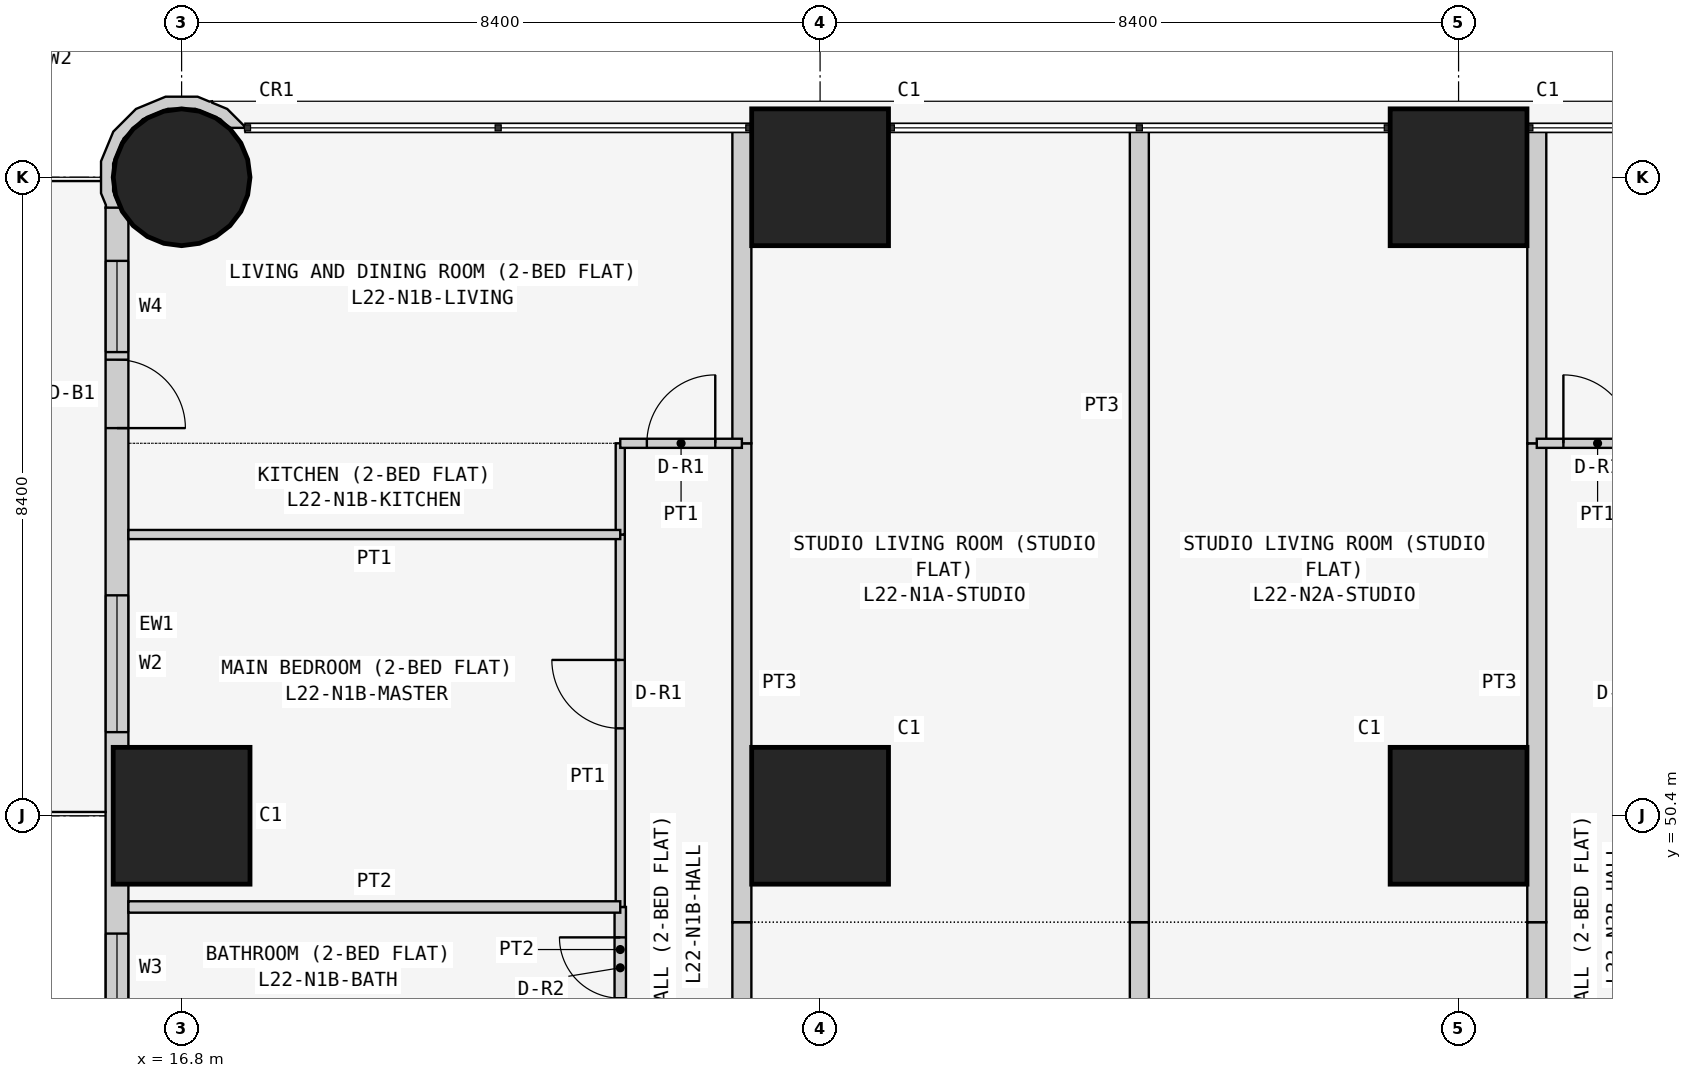
"""IFC4 building model, lengths in metres.
Left out: names, types, materials, properties, quantities, classifications, styles, units other than length and angle.
Written with IfcOpenShell. Run it as: python <this file> out.ifc"""

import sys

from ifc_helpers import new_model, si_unit, direction, frame, frame_2d, origin, origin_2d, place, context, subcontext, project, spatial, polyline, rectangle, circle, outline, extrude, element, fill, save


model = new_model("IFC4")
c1 = context("Model", 3, precision=1e-05, world=origin(), true_north=direction((0.0, 1.0)))
c2 = subcontext(c1, "Body", "Model", "MODEL_VIEW")
j1 = project(units=[si_unit("LENGTHUNIT", "METRE"), si_unit("PLANEANGLEUNIT", "RADIAN")], contexts=[c1])
p1 = place(None, origin())
s1 = spatial("IfcSite", under=j1, at=p1, CompositionType="ELEMENT")
p2 = place(p1, origin())
s2 = spatial("IfcBuilding", under=s1, at=p2, CompositionType="ELEMENT")
p3 = place(p2, frame((0.0, 0.0, 88.5)))
s3 = spatial("IfcBuildingStorey", under=s2, at=p3, CompositionType="ELEMENT", Elevation=88.5)
p4 = place(p3, frame((16.8, 50.4, 0.0), z_axis=(0.0, 0.0, 1.0), x_axis=(1.0, 0.0, 0.0)))
e1 = element("IfcColumn", 1, at=p4, inside=s3, PredefinedType="COLUMN", context=c2, shape_type="SweptSolid", body=[
    extrude(rectangle(XDim=1.8, YDim=1.8, at=origin_2d()), origin(), (0.0, 0.0, 1.0), 3.6),
])
p5 = place(p3, frame((16.8, 58.8, 0.0), z_axis=(0.0, 0.0, 1.0), x_axis=(1.0, 0.0, 0.0)))
e2 = element("IfcColumn", 2, at=p5, inside=s3, PredefinedType="COLUMN", context=c2, shape_type="SweptSolid", body=[
    extrude(circle(Radius=0.9, at=origin_2d()), origin(), (0.0, 0.0, 1.0), 3.6),
])
for number, where, z_axis, x_axis in (
    (3, (25.2, 50.4, 0.0), (0.0, 0.0, 1.0), (1.0, 0.0, 0.0)),
    (4, (25.2, 58.8, 0.0), (0.0, 0.0, 1.0), (1.0, 0.0, 0.0)),
    (5, (33.6, 50.4, 0.0), (0.0, 0.0, 1.0), (1.0, 0.0, 0.0)),
    (6, (33.6, 58.8, 0.0), (0.0, 0.0, 1.0), (1.0, 0.0, 0.0)),
):
    element("IfcColumn", number, at=place(p3, frame(where, z_axis=z_axis, x_axis=x_axis)), inside=s3, PredefinedType="COLUMN", context=c2, shape_type="SweptSolid", body=[
        extrude(rectangle(XDim=1.8, YDim=1.8, at=origin_2d()), origin(), (0.0, 0.0, 1.0), 3.6),
    ])
p6 = place(p3, frame((15.95, 58.4, 0.0), z_axis=(0.0, 0.0, 1.0), x_axis=(0.0, -1.0, 0.0)))
e7 = element("IfcWall", 7, at=p6, inside=s3, PredefinedType="SOLIDWALL", context=c2, shape_type="SweptSolid", body=[
    extrude(rectangle(XDim=15.7, YDim=0.3, at=frame_2d((7.85, 0.0))), origin(), (0.0, 0.0, 1.0), 3.45),
])
p7 = place(p6, frame((12.4, 0.0, 0.9)))
e8 = element("IfcOpeningElement", 8, at=p7, cuts=e7, PredefinedType="OPENING", context=c2, shape_type="SweptSolid", body=[
    extrude(rectangle(XDim=1.8, YDim=1.5, at=frame_2d((0.9, 0.75))), frame((0.0, 0.16, 0.0), z_axis=(0.0, -1.0, 0.0), x_axis=(1.0, 0.0, 0.0)), (0.0, 0.0, 1.0), 0.32),
])
p8 = place(p6, frame((9.55, 0.0, 1.5)))
e9 = element("IfcOpeningElement", 9, at=p8, cuts=e7, PredefinedType="OPENING", context=c2, shape_type="SweptSolid", body=[
    extrude(rectangle(XDim=0.9, YDim=0.7, at=frame_2d((0.45, 0.35))), frame((0.0, 0.16, 0.0), z_axis=(0.0, -1.0, 0.0), x_axis=(1.0, 0.0, 0.0)), (0.0, 0.0, 1.0), 0.32),
])
p9 = place(p6, frame((5.1, 0.0, 0.9)))
e10 = element("IfcOpeningElement", 10, at=p9, cuts=e7, PredefinedType="OPENING", context=c2, shape_type="SweptSolid", body=[
    extrude(rectangle(XDim=1.8, YDim=1.5, at=frame_2d((0.9, 0.75))), frame((0.0, 0.16, 0.0), z_axis=(0.0, -1.0, 0.0), x_axis=(1.0, 0.0, 0.0)), (0.0, 0.0, 1.0), 0.32),
])
p10 = place(p6, frame((2.0, 0.0, 0.0)))
e11 = element("IfcOpeningElement", 11, at=p10, cuts=e7, PredefinedType="OPENING", context=c2, shape_type="SweptSolid", body=[
    extrude(rectangle(XDim=0.9, YDim=2.4, at=frame_2d((0.45, 1.2))), frame((0.0, 0.16, 0.0), z_axis=(0.0, -1.0, 0.0), x_axis=(1.0, 0.0, 0.0)), (0.0, 0.0, 1.0), 0.32),
])
p11 = place(p6, frame((0.7, 0.0, 0.9)))
e12 = element("IfcOpeningElement", 12, at=p11, cuts=e7, PredefinedType="OPENING", context=c2, shape_type="SweptSolid", body=[
    extrude(rectangle(XDim=1.2, YDim=1.5, at=frame_2d((0.6, 0.75))), frame((0.0, 0.16, 0.0), z_axis=(0.0, -1.0, 0.0), x_axis=(1.0, 0.0, 0.0)), (0.0, 0.0, 1.0), 0.32),
])
p12 = place(p3, frame((17.567, 59.411, 0.0), z_axis=(0.0, 0.0, 1.0), x_axis=(-0.377204953059, 0.926129809145, 0.0)))
e13 = element("IfcWall", 13, at=p12, inside=s3, PredefinedType="SOLIDWALL", context=c2, shape_type="SweptSolid", body=[
    extrude(outline(polyline([(-0.27, 2.017), (-0.37, 1.841), (-0.102, 1.842), (0.23, 1.707), (0.484, 1.455), (0.624, 1.125), (0.626, 0.766), (0.491, 0.434), (0.239, 0.18), (0.09, 0.117), (0.011, -0.078), (0.024, -0.083), (0.329, 0.045), (0.48, 0.198), (0.499, 0.193), (0.508, 0.225), (0.626, 0.345), (0.785, 0.736), (0.782, 1.157), (0.619, 1.546), (0.319, 1.842), (-0.072, 2.002), (-0.24, 2.0), (-0.27, 2.017)])), origin(), (0.0, 0.0, 1.0), 3.45),
])
p13 = place(p3, frame((24.171, 49.0, 0.0), z_axis=(0.0, 0.0, 1.0), x_axis=(0.0, -1.0, 0.0)))
e14 = element("IfcWall", 14, at=p13, inside=s3, PredefinedType="PARTITIONING", context=c2, shape_type="SweptSolid", body=[
    extrude(rectangle(XDim=3.6, YDim=0.25, at=frame_2d((1.8, 0.0))), origin(), (0.0, 0.0, 1.0), 3.45),
])
p14 = place(p3, frame((29.4, 45.4, 0.0), z_axis=(0.0, 0.0, 1.0), x_axis=(0.0, 1.0, 0.0)))
e15 = element("IfcWall", 15, at=p14, inside=s3, PredefinedType="PARTITIONING", context=c2, shape_type="SweptSolid", body=[
    extrude(rectangle(XDim=3.6, YDim=0.25, at=frame_2d((1.8, 0.0))), origin(), (0.0, 0.0, 1.0), 2.848),
])
p15 = place(p3, frame((24.171, 55.3, 0.0), z_axis=(0.0, 0.0, 1.0), x_axis=(0.0, -1.0, 0.0)))
e16 = element("IfcWall", 16, at=p15, inside=s3, PredefinedType="PARTITIONING", context=c2, shape_type="SweptSolid", body=[
    extrude(rectangle(XDim=6.3, YDim=0.25, at=frame_2d((3.15, 0.0))), origin(), (0.0, 0.0, 1.0), 3.45),
])
p16 = place(p3, frame((24.171, 59.45, 0.0), z_axis=(0.0, 0.0, 1.0), x_axis=(0.0, -1.0, 0.0)))
e17 = element("IfcWall", 17, at=p16, inside=s3, PredefinedType="PARTITIONING", context=c2, shape_type="SweptSolid", body=[
    extrude(rectangle(XDim=4.15, YDim=0.25, at=frame_2d((2.075, 0.0))), origin(), (0.0, 0.0, 1.0), 3.45),
])
p17 = place(p3, frame((29.4, 49.0, 0.0), z_axis=(0.0, 0.0, 1.0), x_axis=(0.0, 1.0, 0.0)))
e18 = element("IfcWall", 18, at=p17, inside=s3, PredefinedType="PARTITIONING", context=c2, shape_type="SweptSolid", body=[
    extrude(rectangle(XDim=10.45, YDim=0.25, at=frame_2d((5.225, 0.0))), origin(), (0.0, 0.0, 1.0), 2.848),
])
p18 = place(p3, frame((22.571, 49.2, 0.0), z_axis=(0.0, 0.0, 1.0), x_axis=(0.0, -1.0, 0.0)))
e19 = element("IfcWall", 19, at=p18, inside=s3, PredefinedType="PARTITIONING", context=c2, shape_type="SweptSolid", body=[
    extrude(rectangle(XDim=1.6, YDim=0.15, at=frame_2d((0.8, 0.0))), origin(), (0.0, 0.0, 1.0), 3.45),
])
p19 = place(p18, frame((0.4, 0.0, 0.0)))
e20 = element("IfcOpeningElement", 20, at=p19, cuts=e19, PredefinedType="OPENING", context=c2, shape_type="SweptSolid", body=[
    extrude(rectangle(XDim=0.8, YDim=2.1, at=frame_2d((0.4, 1.05))), frame((0.0, 0.085, 0.0), z_axis=(0.0, -1.0, 0.0), x_axis=(1.0, 0.0, 0.0)), (0.0, 0.0, 1.0), 0.17),
])
p20 = place(p3, frame((22.571, 54.1, 0.0), z_axis=(0.0, 0.0, 1.0), x_axis=(0.0, -1.0, 0.0)))
e21 = element("IfcWall", 21, at=p20, inside=s3, PredefinedType="PARTITIONING", context=c2, shape_type="SweptSolid", body=[
    extrude(rectangle(XDim=4.9, YDim=0.12, at=frame_2d((2.45, 0.0))), origin(), (0.0, 0.0, 1.0), 3.45),
])
p21 = place(p20, frame((1.65, 0.0, 0.0)))
e22 = element("IfcOpeningElement", 22, at=p21, cuts=e21, PredefinedType="OPENING", context=c2, shape_type="SweptSolid", body=[
    extrude(rectangle(XDim=0.9, YDim=2.1, at=frame_2d((0.45, 1.05))), frame((0.0, 0.07, 0.0), z_axis=(0.0, -1.0, 0.0), x_axis=(1.0, 0.0, 0.0)), (0.0, 0.0, 1.0), 0.14),
])
p22 = place(p3, frame((22.571, 55.3, 0.0), z_axis=(0.0, 0.0, 1.0), x_axis=(0.0, -1.0, 0.0)))
e23 = element("IfcWall", 23, at=p22, inside=s3, PredefinedType="PARTITIONING", context=c2, shape_type="SweptSolid", body=[
    extrude(rectangle(XDim=1.2, YDim=0.12, at=frame_2d((0.6, 0.0))), origin(), (0.0, 0.0, 1.0), 3.45),
])
p23 = place(p3, frame((24.171, 55.3, 0.0), z_axis=(0.0, 0.0, 1.0), x_axis=(-1.0, 0.0, 0.0)))
e24 = element("IfcWall", 24, at=p23, inside=s3, PredefinedType="PARTITIONING", context=c2, shape_type="SweptSolid", body=[
    extrude(rectangle(XDim=1.6, YDim=0.12, at=frame_2d((0.8, 0.0))), origin(), (0.0, 0.0, 1.0), 3.45),
])
p24 = place(p23, frame((0.35, 0.0, 0.0)))
e25 = element("IfcOpeningElement", 25, at=p24, cuts=e24, PredefinedType="OPENING", context=c2, shape_type="SweptSolid", body=[
    extrude(rectangle(XDim=0.9, YDim=2.1, at=frame_2d((0.45, 1.05))), frame((0.0, 0.07, 0.0), z_axis=(0.0, -1.0, 0.0), x_axis=(1.0, 0.0, 0.0)), (0.0, 0.0, 1.0), 0.14),
])
p25 = place(p3, frame((22.571, 49.2, 0.0), z_axis=(0.0, 0.0, 1.0), x_axis=(-1.0, 0.0, 0.0)))
e26 = element("IfcWall", 26, at=p25, inside=s3, PredefinedType="PARTITIONING", context=c2, shape_type="SweptSolid", body=[
    extrude(rectangle(XDim=6.471, YDim=0.15, at=frame_2d((3.235, 0.0))), origin(), (0.0, 0.0, 1.0), 3.45),
])
p26 = place(p3, frame((22.571, 54.1, 0.0), z_axis=(0.0, 0.0, 1.0), x_axis=(-1.0, 0.0, 0.0)))
e27 = element("IfcWall", 27, at=p26, inside=s3, PredefinedType="PARTITIONING", context=c2, shape_type="SweptSolid", body=[
    extrude(rectangle(XDim=6.471, YDim=0.12, at=frame_2d((3.235, 0.0))), origin(), (0.0, 0.0, 1.0), 3.45),
])
p27 = place(p3, frame((34.629, 49.0, 0.0), z_axis=(0.0, 0.0, 1.0), x_axis=(0.0, -1.0, 0.0)))
e28 = element("IfcWall", 28, at=p27, inside=s3, PredefinedType="PARTITIONING", context=c2, shape_type="SweptSolid", body=[
    extrude(rectangle(XDim=3.6, YDim=0.25, at=frame_2d((1.8, 0.0))), origin(), (0.0, 0.0, 1.0), 3.45),
])
p28 = place(p3, frame((34.629, 55.3, 0.0), z_axis=(0.0, 0.0, 1.0), x_axis=(0.0, -1.0, 0.0)))
e29 = element("IfcWall", 29, at=p28, inside=s3, PredefinedType="PARTITIONING", context=c2, shape_type="SweptSolid", body=[
    extrude(rectangle(XDim=6.3, YDim=0.25, at=frame_2d((3.15, 0.0))), origin(), (0.0, 0.0, 1.0), 3.45),
])
p29 = place(p3, frame((34.629, 59.45, 0.0), z_axis=(0.0, 0.0, 1.0), x_axis=(0.0, -1.0, 0.0)))
e30 = element("IfcWall", 30, at=p29, inside=s3, PredefinedType="PARTITIONING", context=c2, shape_type="SweptSolid", body=[
    extrude(rectangle(XDim=4.15, YDim=0.25, at=frame_2d((2.075, 0.0))), origin(), (0.0, 0.0, 1.0), 3.45),
])
p30 = place(p3, frame((34.629, 55.3, 0.0), z_axis=(0.0, 0.0, 1.0), x_axis=(1.0, 0.0, 0.0)))
e31 = element("IfcWall", 31, at=p30, inside=s3, PredefinedType="PARTITIONING", context=c2, shape_type="SweptSolid", body=[
    extrude(rectangle(XDim=1.6, YDim=0.12, at=frame_2d((0.8, 0.0))), origin(), (0.0, 0.0, 1.0), 3.45),
])
p31 = place(p30, frame((0.35, 0.0, 0.0)))
e32 = element("IfcOpeningElement", 32, at=p31, cuts=e31, PredefinedType="OPENING", context=c2, shape_type="SweptSolid", body=[
    extrude(rectangle(XDim=0.9, YDim=2.1, at=frame_2d((0.45, 1.05))), frame((0.0, 0.07, 0.0), z_axis=(0.0, -1.0, 0.0), x_axis=(1.0, 0.0, 0.0)), (0.0, 0.0, 1.0), 0.14),
])
p32 = place(p8, origin())
e33 = element("IfcWindow", 33, at=p32, inside=s3, PartitioningType="SINGLE_PANEL", PredefinedType="WINDOW", context=c2, shape_type="SweptSolid", body=[
    extrude(rectangle(XDim=0.9, YDim=0.7, at=frame_2d((0.45, 0.35))), frame((0.0, 0.03, 0.0), z_axis=(0.0, -1.0, 0.0), x_axis=(1.0, 0.0, 0.0)), (0.0, 0.0, 1.0), 0.06),
])
fill(e9, e33)
p33 = place(p9, origin())
e34 = element("IfcWindow", 34, at=p33, inside=s3, PartitioningType="SINGLE_PANEL", PredefinedType="WINDOW", context=c2, shape_type="SweptSolid", body=[
    extrude(rectangle(XDim=1.8, YDim=1.5, at=frame_2d((0.9, 0.75))), frame((0.0, 0.03, 0.0), z_axis=(0.0, -1.0, 0.0), x_axis=(1.0, 0.0, 0.0)), (0.0, 0.0, 1.0), 0.06),
])
fill(e10, e34)
p34 = place(p10, origin())
e35 = element("IfcDoor", 35, at=p34, inside=s3, OperationType="SINGLE_SWING_RIGHT", PredefinedType="DOOR", context=c2, shape_type="SweptSolid", body=[
    extrude(rectangle(XDim=0.9, YDim=2.4, at=frame_2d((0.45, 1.2))), frame((0.0, 0.025, 0.0), z_axis=(0.0, -1.0, 0.0), x_axis=(1.0, 0.0, 0.0)), (0.0, 0.0, 1.0), 0.05),
])
fill(e11, e35)
p35 = place(p11, origin())
e36 = element("IfcWindow", 36, at=p35, inside=s3, PartitioningType="SINGLE_PANEL", PredefinedType="WINDOW", context=c2, shape_type="SweptSolid", body=[
    extrude(rectangle(XDim=1.2, YDim=1.5, at=frame_2d((0.6, 0.75))), frame((0.0, 0.03, 0.0), z_axis=(0.0, -1.0, 0.0), x_axis=(1.0, 0.0, 0.0)), (0.0, 0.0, 1.0), 0.06),
])
fill(e12, e36)
p36 = place(p19, frame((0.8, 0.0, 0.0), z_axis=(0.0, 0.0, 1.0), x_axis=(-1.0, 0.0, 0.0)))
e37 = element("IfcDoor", 37, at=p36, inside=s3, OperationType="SINGLE_SWING_RIGHT", PredefinedType="DOOR", context=c2, shape_type="SweptSolid", body=[
    extrude(rectangle(XDim=0.8, YDim=2.1, at=frame_2d((0.4, 1.05))), frame((0.0, 0.025, 0.0), z_axis=(0.0, -1.0, 0.0), x_axis=(1.0, 0.0, 0.0)), (0.0, 0.0, 1.0), 0.05),
])
fill(e20, e37)
p37 = place(p21, frame((0.9, 0.0, 0.0), z_axis=(0.0, 0.0, 1.0), x_axis=(-1.0, 0.0, 0.0)))
e38 = element("IfcDoor", 38, at=p37, inside=s3, OperationType="SINGLE_SWING_RIGHT", PredefinedType="DOOR", context=c2, shape_type="SweptSolid", body=[
    extrude(rectangle(XDim=0.9, YDim=2.1, at=frame_2d((0.45, 1.05))), frame((0.0, 0.025, 0.0), z_axis=(0.0, -1.0, 0.0), x_axis=(1.0, 0.0, 0.0)), (0.0, 0.0, 1.0), 0.05),
])
fill(e22, e38)
p38 = place(p24, frame((0.9, 0.0, 0.0), z_axis=(0.0, 0.0, 1.0), x_axis=(-1.0, 0.0, 0.0)))
e39 = element("IfcDoor", 39, at=p38, inside=s3, OperationType="SINGLE_SWING_RIGHT", PredefinedType="DOOR", context=c2, shape_type="SweptSolid", body=[
    extrude(rectangle(XDim=0.9, YDim=2.1, at=frame_2d((0.45, 1.05))), frame((0.0, 0.025, 0.0), z_axis=(0.0, -1.0, 0.0), x_axis=(1.0, 0.0, 0.0)), (0.0, 0.0, 1.0), 0.05),
])
fill(e25, e39)
p39 = place(p31, origin())
e40 = element("IfcDoor", 40, at=p39, inside=s3, OperationType="SINGLE_SWING_LEFT", PredefinedType="DOOR", context=c2, shape_type="SweptSolid", body=[
    extrude(rectangle(XDim=0.9, YDim=2.1, at=frame_2d((0.45, 1.05))), frame((0.0, 0.025, 0.0), z_axis=(0.0, -1.0, 0.0), x_axis=(1.0, 0.0, 0.0)), (0.0, 0.0, 1.0), 0.05),
])
fill(e32, e40)
save(model, sys.argv[1])
